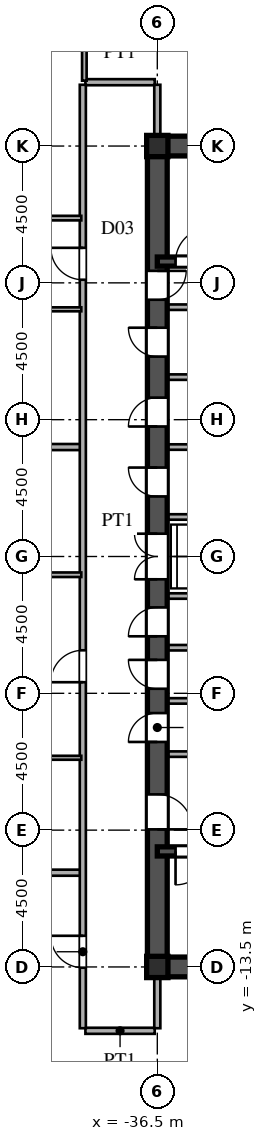
"""IFC4 building model, lengths in metres.
Left out: names, types, materials, properties, quantities, classifications, styles, units other than length and angle.
Written with IfcOpenShell. Run it as: python <this file> out.ifc"""

import sys

from ifc_helpers import new_model, si_unit, direction, frame, frame_2d, origin, origin_2d, place, context, subcontext, project, spatial, rectangle, i_section, extrude, source, transform, mapped, element, fill, save


model = new_model("IFC4")
c1 = context("Model", 3, precision=1e-05, world=origin(), true_north=direction((0.0, 1.0)))
c2 = subcontext(c1, "Body", "Model", "MODEL_VIEW")
j1 = project(units=[si_unit("LENGTHUNIT", "METRE"), si_unit("PLANEANGLEUNIT", "RADIAN")], contexts=[c1])
p1 = place(None, origin())
s1 = spatial("IfcSite", under=j1, at=p1, CompositionType="ELEMENT")
p2 = place(p1, origin())
s2 = spatial("IfcBuilding", under=s1, at=p2, CompositionType="ELEMENT")
p3 = place(p2, frame((0.0, 0.0, 121.2)))
s3 = spatial("IfcBuildingStorey", under=s2, at=p3, CompositionType="ELEMENT", Elevation=121.2)
m1 = source(origin(), c2, "Body", "SweptSolid", [
    extrude(i_section(OverallWidth=0.7, OverallDepth=0.7, WebThickness=0.028, FlangeThickness=0.045, at=origin_2d()), origin(), (0.0, 0.0, 1.0), 3.6),
])
for number, where, z_axis, x_axis in (
    (1, (-36.5, -13.5, 0.0), (0.0, 0.0, 1.0), (1.0, 0.0, 0.0)),
    (2, (-36.5, 13.5, 0.0), (0.0, 0.0, 1.0), (1.0, 0.0, 0.0)),
):
    element("IfcColumn", number, at=place(p3, frame(where, z_axis=z_axis, x_axis=x_axis)), inside=s3, PredefinedType="COLUMN", context=c2, shape_type="MappedRepresentation", body=[
        mapped(m1, transform((0.0, 0.0, 0.0), scale=1.0)),
    ])
for number, where, z_axis, x_axis in (
    (3, (-36.5, -13.5, 0.0), (0.0, 0.0, 1.0), (1.0, 0.0, 0.0)),
    (4, (-36.5, 13.5, 0.0), (0.0, 0.0, 1.0), (1.0, 0.0, 0.0)),
):
    element("IfcWall", number, at=place(p3, frame(where, z_axis=z_axis, x_axis=x_axis)), inside=s3, PredefinedType="SHEAR", context=c2, shape_type="SweptSolid", body=[
        extrude(rectangle(XDim=9.0, YDim=0.65, at=frame_2d((4.5, 0.0))), origin(), (0.0, 0.0, 1.0), 3.38),
    ])
p4 = place(p3, frame((-36.5, -13.65, 0.0), z_axis=(0.0, 0.0, 1.0), x_axis=(0.0, 1.0, 0.0)))
e5 = element("IfcWall", 5, at=p4, inside=s3, PredefinedType="SHEAR", context=c2, shape_type="SweptSolid", body=[
    extrude(rectangle(XDim=7.15, YDim=0.65, at=frame_2d((3.575, 0.0))), origin(), (0.0, 0.0, 1.0), 3.38),
])
p5 = place(p4, frame((4.675, 0.0, 0.0)))
e6 = element("IfcOpeningElement", 6, at=p5, cuts=e5, PredefinedType="OPENING", context=c2, shape_type="SweptSolid", body=[
    extrude(rectangle(XDim=1.15, YDim=2.2, at=frame_2d((0.575, 1.1))), frame((0.0, 0.335, 0.0), z_axis=(0.0, -1.0, 0.0), x_axis=(1.0, 0.0, 0.0)), (0.0, 0.0, 1.0), 0.67),
])
p6 = place(p3, frame((-36.5, -1.3, 0.0), z_axis=(0.0, 0.0, 1.0), x_axis=(0.0, 1.0, 0.0)))
e7 = element("IfcWall", 7, at=p6, inside=s3, PredefinedType="SHEAR", context=c2, shape_type="SweptSolid", body=[
    extrude(rectangle(XDim=2.6, YDim=0.65, at=frame_2d((1.3, 0.0))), origin(), (0.0, 0.0, 1.0), 3.38),
])
p7 = place(p6, frame((0.55, 0.0, 0.0)))
e8 = element("IfcOpeningElement", 8, at=p7, cuts=e7, PredefinedType="OPENING", context=c2, shape_type="SweptSolid", body=[
    extrude(rectangle(XDim=1.5, YDim=2.3, at=frame_2d((0.75, 1.15))), frame((0.0, 0.335, 0.0), z_axis=(0.0, -1.0, 0.0), x_axis=(1.0, 0.0, 0.0)), (0.0, 0.0, 1.0), 0.67),
])
p8 = place(p3, frame((-36.5, 8.2, 0.0), z_axis=(0.0, 0.0, 1.0), x_axis=(0.0, 1.0, 0.0)))
e9 = element("IfcWall", 9, at=p8, inside=s3, PredefinedType="SHEAR", context=c2, shape_type="SweptSolid", body=[
    extrude(rectangle(XDim=5.45, YDim=0.65, at=frame_2d((2.725, 0.0))), origin(), (0.0, 0.0, 1.0), 3.38),
])
p9 = place(p8, frame((0.245, 0.0, 0.0)))
e10 = element("IfcOpeningElement", 10, at=p9, cuts=e9, PredefinedType="OPENING", context=c2, shape_type="SweptSolid", body=[
    extrude(rectangle(XDim=0.95, YDim=2.15, at=frame_2d((0.475, 1.075))), frame((0.0, 0.335, 0.0), z_axis=(0.0, -1.0, 0.0), x_axis=(1.0, 0.0, 0.0)), (0.0, 0.0, 1.0), 0.67),
])
p10 = place(p3, frame((-36.5, -6.5, 0.0), z_axis=(0.0, 0.0, 1.0), x_axis=(0.0, 1.0, 0.0)))
e11 = element("IfcWall", 11, at=p10, inside=s3, PredefinedType="SHEAR", context=c2, shape_type="SweptSolid", body=[
    extrude(rectangle(XDim=1.75, YDim=0.65, at=frame_2d((0.875, 0.0))), origin(), (0.0, 0.0, 1.0), 3.38),
])
p11 = place(p10, frame((0.4, 0.0, 0.0)))
e12 = element("IfcOpeningElement", 12, at=p11, cuts=e11, PredefinedType="OPENING", context=c2, shape_type="SweptSolid", body=[
    extrude(rectangle(XDim=0.95, YDim=2.15, at=frame_2d((0.475, 1.075))), frame((0.0, 0.335, 0.0), z_axis=(0.0, -1.0, 0.0), x_axis=(1.0, 0.0, 0.0)), (0.0, 0.0, 1.0), 0.67),
])
p12 = place(p3, frame((-36.5, -4.75, 0.0), z_axis=(0.0, 0.0, 1.0), x_axis=(0.0, 1.0, 0.0)))
e13 = element("IfcWall", 13, at=p12, inside=s3, PredefinedType="SHEAR", context=c2, shape_type="SweptSolid", body=[
    extrude(rectangle(XDim=1.75, YDim=0.65, at=frame_2d((0.875, 0.0))), origin(), (0.0, 0.0, 1.0), 3.38),
])
p13 = place(p12, frame((0.4, 0.0, 0.0)))
e14 = element("IfcOpeningElement", 14, at=p13, cuts=e13, PredefinedType="OPENING", context=c2, shape_type="SweptSolid", body=[
    extrude(rectangle(XDim=0.95, YDim=2.15, at=frame_2d((0.475, 1.075))), frame((0.0, 0.335, 0.0), z_axis=(0.0, -1.0, 0.0), x_axis=(1.0, 0.0, 0.0)), (0.0, 0.0, 1.0), 0.67),
])
p14 = place(p3, frame((-36.5, -3.0, 0.0), z_axis=(0.0, 0.0, 1.0), x_axis=(0.0, 1.0, 0.0)))
e15 = element("IfcWall", 15, at=p14, inside=s3, PredefinedType="SHEAR", context=c2, shape_type="SweptSolid", body=[
    extrude(rectangle(XDim=1.7, YDim=0.65, at=frame_2d((0.85, 0.0))), origin(), (0.0, 0.0, 1.0), 3.38),
])
p15 = place(p14, frame((0.375, 0.0, 0.0)))
e16 = element("IfcOpeningElement", 16, at=p15, cuts=e15, PredefinedType="OPENING", context=c2, shape_type="SweptSolid", body=[
    extrude(rectangle(XDim=0.95, YDim=2.15, at=frame_2d((0.475, 1.075))), frame((0.0, 0.335, 0.0), z_axis=(0.0, -1.0, 0.0), x_axis=(1.0, 0.0, 0.0)), (0.0, 0.0, 1.0), 0.67),
])
p16 = place(p3, frame((-36.5, 1.3, 0.0), z_axis=(0.0, 0.0, 1.0), x_axis=(0.0, 1.0, 0.0)))
e17 = element("IfcWall", 17, at=p16, inside=s3, PredefinedType="SHEAR", context=c2, shape_type="SweptSolid", body=[
    extrude(rectangle(XDim=2.3, YDim=0.65, at=frame_2d((1.15, 0.0))), origin(), (0.0, 0.0, 1.0), 3.38),
])
p17 = place(p16, frame((0.675, 0.0, 0.0)))
e18 = element("IfcOpeningElement", 18, at=p17, cuts=e17, PredefinedType="OPENING", context=c2, shape_type="SweptSolid", body=[
    extrude(rectangle(XDim=0.95, YDim=2.15, at=frame_2d((0.475, 1.075))), frame((0.0, 0.335, 0.0), z_axis=(0.0, -1.0, 0.0), x_axis=(1.0, 0.0, 0.0)), (0.0, 0.0, 1.0), 0.67),
])
p18 = place(p3, frame((-36.5, 3.6, 0.0), z_axis=(0.0, 0.0, 1.0), x_axis=(0.0, 1.0, 0.0)))
e19 = element("IfcWall", 19, at=p18, inside=s3, PredefinedType="SHEAR", context=c2, shape_type="SweptSolid", body=[
    extrude(rectangle(XDim=2.3, YDim=0.65, at=frame_2d((1.15, 0.0))), origin(), (0.0, 0.0, 1.0), 3.38),
])
p19 = place(p18, frame((0.675, 0.0, 0.0)))
e20 = element("IfcOpeningElement", 20, at=p19, cuts=e19, PredefinedType="OPENING", context=c2, shape_type="SweptSolid", body=[
    extrude(rectangle(XDim=0.95, YDim=2.15, at=frame_2d((0.475, 1.075))), frame((0.0, 0.335, 0.0), z_axis=(0.0, -1.0, 0.0), x_axis=(1.0, 0.0, 0.0)), (0.0, 0.0, 1.0), 0.67),
])
p20 = place(p3, frame((-36.5, 5.9, 0.0), z_axis=(0.0, 0.0, 1.0), x_axis=(0.0, 1.0, 0.0)))
e21 = element("IfcWall", 21, at=p20, inside=s3, PredefinedType="SHEAR", context=c2, shape_type="SweptSolid", body=[
    extrude(rectangle(XDim=2.3, YDim=0.65, at=frame_2d((1.15, 0.0))), origin(), (0.0, 0.0, 1.0), 3.38),
])
p21 = place(p20, frame((0.675, 0.0, 0.0)))
e22 = element("IfcOpeningElement", 22, at=p21, cuts=e21, PredefinedType="OPENING", context=c2, shape_type="SweptSolid", body=[
    extrude(rectangle(XDim=0.95, YDim=2.15, at=frame_2d((0.475, 1.075))), frame((0.0, 0.335, 0.0), z_axis=(0.0, -1.0, 0.0), x_axis=(1.0, 0.0, 0.0)), (0.0, 0.0, 1.0), 0.67),
])
p22 = place(p3, frame((-36.5, -9.7, 0.0), z_axis=(0.0, 0.0, 1.0), x_axis=(1.0, 0.0, 0.0)))
e23 = element("IfcWall", 23, at=p22, inside=s3, PredefinedType="SHEAR", context=c2, shape_type="SweptSolid", body=[
    extrude(rectangle(XDim=9.0, YDim=0.3, at=frame_2d((4.5, 0.0))), origin(), (0.0, 0.0, 1.0), 3.38),
])
p23 = place(p22, frame((0.6, 0.0, 0.0)))
e24 = element("IfcOpeningElement", 24, at=p23, cuts=e23, PredefinedType="OPENING", context=c2, shape_type="SweptSolid", body=[
    extrude(rectangle(XDim=1.1, YDim=2.2, at=frame_2d((0.55, 1.1))), frame((0.0, 0.16, 0.0), z_axis=(0.0, -1.0, 0.0), x_axis=(1.0, 0.0, 0.0)), (0.0, 0.0, 1.0), 0.32),
])
p24 = place(p3, frame((-36.5, 9.7, 0.0), z_axis=(0.0, 0.0, 1.0), x_axis=(1.0, 0.0, 0.0)))
e25 = element("IfcWall", 25, at=p24, inside=s3, PredefinedType="SHEAR", context=c2, shape_type="SweptSolid", body=[
    extrude(rectangle(XDim=9.0, YDim=0.3, at=frame_2d((4.5, 0.0))), origin(), (0.0, 0.0, 1.0), 3.38),
])
p25 = place(p24, frame((0.6, 0.0, 0.0)))
e26 = element("IfcOpeningElement", 26, at=p25, cuts=e25, PredefinedType="OPENING", context=c2, shape_type="SweptSolid", body=[
    extrude(rectangle(XDim=1.1, YDim=2.2, at=frame_2d((0.55, 1.1))), frame((0.0, 0.16, 0.0), z_axis=(0.0, -1.0, 0.0), x_axis=(1.0, 0.0, 0.0)), (0.0, 0.0, 1.0), 0.32),
])
for number, where, z_axis, x_axis in (
    (27, (-36.15, -6.5, 0.0), (0.0, 0.0, 1.0), (1.0, 0.0, 0.0)),
    (28, (-36.15, 8.2, 0.0), (0.0, 0.0, 1.0), (1.0, 0.0, 0.0)),
):
    element("IfcWall", number, at=place(p3, frame(where, z_axis=z_axis, x_axis=x_axis)), inside=s3, PredefinedType="PARTITIONING", context=c2, shape_type="SweptSolid", body=[
        extrude(rectangle(XDim=5.7, YDim=0.18, at=frame_2d((2.85, 0.0))), origin(), (0.0, 0.0, 1.0), 3.38),
    ])
for number, where, z_axis, x_axis in (
    (29, (-36.15, -1.3, 0.0), (0.0, 0.0, 1.0), (1.0, 0.0, 0.0)),
    (30, (-36.15, 1.3, 0.0), (0.0, 0.0, 1.0), (1.0, 0.0, 0.0)),
    (31, (-36.15, -4.75, 0.0), (0.0, 0.0, 1.0), (1.0, 0.0, 0.0)),
    (32, (-36.15, -3.0, 0.0), (0.0, 0.0, 1.0), (1.0, 0.0, 0.0)),
    (33, (-36.15, 3.6, 0.0), (0.0, 0.0, 1.0), (1.0, 0.0, 0.0)),
    (34, (-36.15, 5.9, 0.0), (0.0, 0.0, 1.0), (1.0, 0.0, 0.0)),
):
    element("IfcWall", number, at=place(p3, frame(where, z_axis=z_axis, x_axis=x_axis)), inside=s3, PredefinedType="PARTITIONING", context=c2, shape_type="SweptSolid", body=[
        extrude(rectangle(XDim=2.95, YDim=0.18, at=frame_2d((1.475, 0.0))), origin(), (0.0, 0.0, 1.0), 3.38),
    ])
p26 = place(p3, frame((-38.865, -15.6, 0.0), z_axis=(0.0, 0.0, 1.0), x_axis=(1.0, 0.0, 0.0)))
e35 = element("IfcWall", 35, at=p26, inside=s3, PredefinedType="PARTITIONING", context=c2, shape_type="SweptSolid", body=[
    extrude(rectangle(XDim=2.28, YDim=0.2, at=frame_2d((1.14, 0.0))), origin(), (0.0, 0.0, 1.0), 3.38),
])
p27 = place(p3, frame((-58.988, -10.4, 0.0), z_axis=(0.0, 0.0, 1.0), x_axis=(1.0, 0.0, 0.0)))
e36 = element("IfcWall", 36, at=p27, inside=s3, PredefinedType="PARTITIONING", context=c2, shape_type="SweptSolid", body=[
    extrude(rectangle(XDim=19.958, YDim=0.2, at=frame_2d((9.979, 0.0))), origin(), (0.0, 0.0, 1.0), 3.38),
])
p28 = place(p3, frame((-42.35, -6.62, 0.0), z_axis=(0.0, 0.0, 1.0), x_axis=(1.0, 0.0, 0.0)))
e37 = element("IfcWall", 37, at=p28, inside=s3, PredefinedType="PARTITIONING", context=c2, shape_type="SweptSolid", body=[
    extrude(rectangle(XDim=3.35, YDim=0.13, at=frame_2d((1.675, 0.0))), origin(), (0.0, 0.0, 1.0), 3.38),
])
p29 = place(p28, frame((1.235, 0.0, 0.0)))
e38 = element("IfcOpeningElement", 38, at=p29, cuts=e37, PredefinedType="OPENING", context=c2, shape_type="SweptSolid", body=[
    extrude(rectangle(XDim=0.88, YDim=2.1, at=frame_2d((0.44, 1.05))), frame((0.0, 0.075, 0.0), z_axis=(0.0, -1.0, 0.0), x_axis=(1.0, 0.0, 0.0)), (0.0, 0.0, 1.0), 0.15),
])
p30 = place(p3, frame((-42.35, -0.6, 0.0), z_axis=(0.0, 0.0, 1.0), x_axis=(1.0, 0.0, 0.0)))
e39 = element("IfcWall", 39, at=p30, inside=s3, PredefinedType="PARTITIONING", context=c2, shape_type="SweptSolid", body=[
    extrude(rectangle(XDim=3.35, YDim=0.15, at=frame_2d((1.675, 0.0))), origin(), (0.0, 0.0, 1.0), 3.38),
])
p31 = place(p30, frame((1.2, 0.0, 0.0)))
e40 = element("IfcOpeningElement", 40, at=p31, cuts=e39, PredefinedType="OPENING", context=c2, shape_type="SweptSolid", body=[
    extrude(rectangle(XDim=0.95, YDim=2.15, at=frame_2d((0.475, 1.075))), frame((0.0, 0.085, 0.0), z_axis=(0.0, -1.0, 0.0), x_axis=(1.0, 0.0, 0.0)), (0.0, 0.0, 1.0), 0.17),
])
p32 = place(p3, frame((-69.505, 3.6, 0.0), z_axis=(0.0, 0.0, 1.0), x_axis=(1.0, 0.0, 0.0)))
e41 = element("IfcWall", 41, at=p32, inside=s3, PredefinedType="PARTITIONING", context=c2, shape_type="SweptSolid", body=[
    extrude(rectangle(XDim=30.475, YDim=0.2, at=frame_2d((15.237, 0.0))), origin(), (0.0, 0.0, 1.0), 3.38),
])
p33 = place(p3, frame((-42.35, 8.13, 0.0), z_axis=(0.0, 0.0, 1.0), x_axis=(1.0, 0.0, 0.0)))
e42 = element("IfcWall", 42, at=p33, inside=s3, PredefinedType="PARTITIONING", context=c2, shape_type="SweptSolid", body=[
    extrude(rectangle(XDim=3.35, YDim=0.13, at=frame_2d((1.675, 0.0))), origin(), (0.0, 0.0, 1.0), 3.38),
])
p34 = place(p33, frame((1.235, 0.0, 0.0)))
e43 = element("IfcOpeningElement", 43, at=p34, cuts=e42, PredefinedType="OPENING", context=c2, shape_type="SweptSolid", body=[
    extrude(rectangle(XDim=0.88, YDim=2.1, at=frame_2d((0.44, 1.05))), frame((0.0, 0.075, 0.0), z_axis=(0.0, -1.0, 0.0), x_axis=(1.0, 0.0, 0.0)), (0.0, 0.0, 1.0), 0.15),
])
p35 = place(p3, frame((-42.35, 11.13, 0.0), z_axis=(0.0, 0.0, 1.0), x_axis=(1.0, 0.0, 0.0)))
e44 = element("IfcWall", 44, at=p35, inside=s3, PredefinedType="PARTITIONING", context=c2, shape_type="SweptSolid", body=[
    extrude(rectangle(XDim=3.35, YDim=0.15, at=frame_2d((1.675, 0.0))), origin(), (0.0, 0.0, 1.0), 3.38),
])
p36 = place(p35, frame((1.2, 0.0, 0.0)))
e45 = element("IfcOpeningElement", 45, at=p36, cuts=e44, PredefinedType="OPENING", context=c2, shape_type="SweptSolid", body=[
    extrude(rectangle(XDim=0.95, YDim=2.15, at=frame_2d((0.475, 1.075))), frame((0.0, 0.085, 0.0), z_axis=(0.0, -1.0, 0.0), x_axis=(1.0, 0.0, 0.0)), (0.0, 0.0, 1.0), 0.17),
])
p37 = place(p3, frame((-38.865, 15.6, 0.0), z_axis=(0.0, 0.0, 1.0), x_axis=(1.0, 0.0, 0.0)))
e46 = element("IfcWall", 46, at=p37, inside=s3, PredefinedType="PARTITIONING", context=c2, shape_type="SweptSolid", body=[
    extrude(rectangle(XDim=2.28, YDim=0.2, at=frame_2d((1.14, 0.0))), origin(), (0.0, 0.0, 1.0), 3.38),
])
p38 = place(p3, frame((-38.95, -15.515, 0.0), z_axis=(0.0, 0.0, 1.0), x_axis=(0.0, 1.0, 0.0)))
e47 = element("IfcWall", 47, at=p38, inside=s3, PredefinedType="PARTITIONING", context=c2, shape_type="SweptSolid", body=[
    extrude(rectangle(XDim=31.03, YDim=0.2, at=frame_2d((15.515, 0.0))), origin(), (0.0, 0.0, 1.0), 3.38),
])
p39 = place(p38, frame((1.99, 0.0, 0.0)))
e48 = element("IfcOpeningElement", 48, at=p39, cuts=e47, PredefinedType="OPENING", context=c2, shape_type="SweptSolid", body=[
    extrude(rectangle(XDim=1.05, YDim=2.25, at=frame_2d((0.525, 1.125))), frame((0.0, 0.11, 0.0), z_axis=(0.0, -1.0, 0.0), x_axis=(1.0, 0.0, 0.0)), (0.0, 0.0, 1.0), 0.22),
])
p40 = place(p38, frame((11.38, 0.0, 0.0)))
e49 = element("IfcOpeningElement", 49, at=p40, cuts=e47, PredefinedType="OPENING", context=c2, shape_type="SweptSolid", body=[
    extrude(rectangle(XDim=1.05, YDim=2.25, at=frame_2d((0.525, 1.125))), frame((0.0, 0.11, 0.0), z_axis=(0.0, -1.0, 0.0), x_axis=(1.0, 0.0, 0.0)), (0.0, 0.0, 1.0), 0.22),
])
p41 = place(p38, frame((24.617, 0.0, 0.0)))
e50 = element("IfcOpeningElement", 50, at=p41, cuts=e47, PredefinedType="OPENING", context=c2, shape_type="SweptSolid", body=[
    extrude(rectangle(XDim=1.05, YDim=2.25, at=frame_2d((0.525, 1.125))), frame((0.0, 0.11, 0.0), z_axis=(0.0, -1.0, 0.0), x_axis=(1.0, 0.0, 0.0)), (0.0, 0.0, 1.0), 0.22),
])
p42 = place(p3, frame((-38.9, 15.65, 0.0), z_axis=(0.0, 0.0, 1.0), x_axis=(0.0, 1.0, 0.0)))
e51 = element("IfcWall", 51, at=p42, inside=s3, PredefinedType="PARTITIONING", context=c2, shape_type="SweptSolid", body=[
    extrude(rectangle(XDim=5.088, YDim=0.15, at=frame_2d((2.544, 0.0))), origin(), (0.0, 0.0, 1.0), 3.38),
])
p43 = place(p42, frame((1.175, 0.0, 0.0)))
e52 = element("IfcOpeningElement", 52, at=p43, cuts=e51, PredefinedType="OPENING", context=c2, shape_type="SweptSolid", body=[
    extrude(rectangle(XDim=0.95, YDim=2.15, at=frame_2d((0.475, 1.075))), frame((0.0, 0.085, 0.0), z_axis=(0.0, -1.0, 0.0), x_axis=(1.0, 0.0, 0.0)), (0.0, 0.0, 1.0), 0.17),
])
for number, where, z_axis, x_axis in (
    (53, (-36.5, -15.515, 0.0), (0.0, 0.0, 1.0), (0.0, 1.0, 0.0)),
    (54, (-36.5, 13.83, 0.0), (0.0, 0.0, 1.0), (0.0, 1.0, 0.0)),
):
    element("IfcWall", number, at=place(p3, frame(where, z_axis=z_axis, x_axis=x_axis)), inside=s3, PredefinedType="PARTITIONING", context=c2, shape_type="SweptSolid", body=[
        extrude(rectangle(XDim=1.685, YDim=0.2, at=frame_2d((0.842, 0.0))), origin(), (0.0, 0.0, 1.0), 2.78),
    ])
m2 = source(origin(), c2, "Body", "SweptSolid", [
    extrude(rectangle(XDim=1.15, YDim=2.2, at=frame_2d((0.575, 1.1))), frame((0.0, 0.025, 0.0), z_axis=(0.0, -1.0, 0.0), x_axis=(1.0, 0.0, 0.0)), (0.0, 0.0, 1.0), 0.05),
])
p44 = place(p5, frame((1.15, 0.0, 0.0), z_axis=(0.0, 0.0, 1.0), x_axis=(-1.0, 0.0, 0.0)))
e55 = element("IfcDoor", 55, at=p44, inside=s3, OperationType="SINGLE_SWING_LEFT", PredefinedType="DOOR", context=c2, shape_type="MappedRepresentation", body=[
    mapped(m2, transform((0.0, 0.0, 0.0), scale=1.0)),
])
fill(e6, e55)
m3 = source(origin(), c2, "Body", "SweptSolid", [
    extrude(rectangle(XDim=1.5, YDim=2.3, at=frame_2d((0.75, 1.15))), frame((0.0, 0.025, 0.0), z_axis=(0.0, -1.0, 0.0), x_axis=(1.0, 0.0, 0.0)), (0.0, 0.0, 1.0), 0.05),
])
p45 = place(p7, origin())
e56 = element("IfcDoor", 56, at=p45, inside=s3, OperationType="DOUBLE_SWING_LEFT", PredefinedType="DOOR", context=c2, shape_type="MappedRepresentation", body=[
    mapped(m3, transform((0.0, 0.0, 0.0), scale=1.0)),
])
fill(e8, e56)
m4 = source(origin(), c2, "Body", "SweptSolid", [
    extrude(rectangle(XDim=0.95, YDim=2.15, at=frame_2d((0.475, 1.075))), frame((0.0, 0.025, 0.0), z_axis=(0.0, -1.0, 0.0), x_axis=(1.0, 0.0, 0.0)), (0.0, 0.0, 1.0), 0.05),
])
p46 = place(p9, frame((0.95, 0.0, 0.0), z_axis=(0.0, 0.0, 1.0), x_axis=(-1.0, 0.0, 0.0)))
e57 = element("IfcDoor", 57, at=p46, inside=s3, OperationType="SINGLE_SWING_RIGHT", PredefinedType="DOOR", context=c2, shape_type="MappedRepresentation", body=[
    mapped(m4, transform((0.0, 0.0, 0.0), scale=1.0)),
])
fill(e10, e57)
p47 = place(p11, origin())
e58 = element("IfcDoor", 58, at=p47, inside=s3, OperationType="SINGLE_SWING_LEFT", PredefinedType="DOOR", context=c2, shape_type="MappedRepresentation", body=[
    mapped(m4, transform((0.0, 0.0, 0.0), scale=1.0)),
])
fill(e12, e58)
p48 = place(p13, origin())
e59 = element("IfcDoor", 59, at=p48, inside=s3, OperationType="SINGLE_SWING_RIGHT", PredefinedType="DOOR", context=c2, shape_type="MappedRepresentation", body=[
    mapped(m4, transform((0.0, 0.0, 0.0), scale=1.0)),
])
fill(e14, e59)
p49 = place(p15, origin())
e60 = element("IfcDoor", 60, at=p49, inside=s3, OperationType="SINGLE_SWING_LEFT", PredefinedType="DOOR", context=c2, shape_type="MappedRepresentation", body=[
    mapped(m4, transform((0.0, 0.0, 0.0), scale=1.0)),
])
fill(e16, e60)
p50 = place(p17, origin())
e61 = element("IfcDoor", 61, at=p50, inside=s3, OperationType="SINGLE_SWING_RIGHT", PredefinedType="DOOR", context=c2, shape_type="MappedRepresentation", body=[
    mapped(m4, transform((0.0, 0.0, 0.0), scale=1.0)),
])
fill(e18, e61)
p51 = place(p19, origin())
e62 = element("IfcDoor", 62, at=p51, inside=s3, OperationType="SINGLE_SWING_LEFT", PredefinedType="DOOR", context=c2, shape_type="MappedRepresentation", body=[
    mapped(m4, transform((0.0, 0.0, 0.0), scale=1.0)),
])
fill(e20, e62)
p52 = place(p21, origin())
e63 = element("IfcDoor", 63, at=p52, inside=s3, OperationType="SINGLE_SWING_RIGHT", PredefinedType="DOOR", context=c2, shape_type="MappedRepresentation", body=[
    mapped(m4, transform((0.0, 0.0, 0.0), scale=1.0)),
])
fill(e22, e63)
m5 = source(origin(), c2, "Body", "SweptSolid", [
    extrude(rectangle(XDim=1.1, YDim=2.2, at=frame_2d((0.55, 1.1))), frame((0.0, 0.025, 0.0), z_axis=(0.0, -1.0, 0.0), x_axis=(1.0, 0.0, 0.0)), (0.0, 0.0, 1.0), 0.05),
])
p53 = place(p23, frame((1.1, 0.0, 0.0), z_axis=(0.0, 0.0, 1.0), x_axis=(-1.0, 0.0, 0.0)))
e64 = element("IfcDoor", 64, at=p53, inside=s3, OperationType="SINGLE_SWING_LEFT", PredefinedType="DOOR", context=c2, shape_type="MappedRepresentation", body=[
    mapped(m5, transform((0.0, 0.0, 0.0), scale=1.0)),
])
fill(e24, e64)
p54 = place(p25, origin())
e65 = element("IfcDoor", 65, at=p54, inside=s3, OperationType="SINGLE_SWING_RIGHT", PredefinedType="DOOR", context=c2, shape_type="MappedRepresentation", body=[
    mapped(m5, transform((0.0, 0.0, 0.0), scale=1.0)),
])
fill(e26, e65)
m6 = source(origin(), c2, "Body", "SweptSolid", [
    extrude(rectangle(XDim=1.05, YDim=2.25, at=frame_2d((0.525, 1.125))), frame((0.0, 0.025, 0.0), z_axis=(0.0, -1.0, 0.0), x_axis=(1.0, 0.0, 0.0)), (0.0, 0.0, 1.0), 0.05),
])
p55 = place(p39, origin())
e66 = element("IfcDoor", 66, at=p55, inside=s3, OperationType="SINGLE_SWING_RIGHT", PredefinedType="DOOR", context=c2, shape_type="MappedRepresentation", body=[
    mapped(m6, transform((0.0, 0.0, 0.0), scale=1.0)),
])
fill(e48, e66)
p56 = place(p40, origin())
e67 = element("IfcDoor", 67, at=p56, inside=s3, OperationType="SINGLE_SWING_LEFT", PredefinedType="DOOR", context=c2, shape_type="MappedRepresentation", body=[
    mapped(m6, transform((0.0, 0.0, 0.0), scale=1.0)),
])
fill(e49, e67)
p57 = place(p41, origin())
e68 = element("IfcDoor", 68, at=p57, inside=s3, OperationType="SINGLE_SWING_RIGHT", PredefinedType="DOOR", context=c2, shape_type="MappedRepresentation", body=[
    mapped(m6, transform((0.0, 0.0, 0.0), scale=1.0)),
])
fill(e50, e68)
save(model, sys.argv[1])
